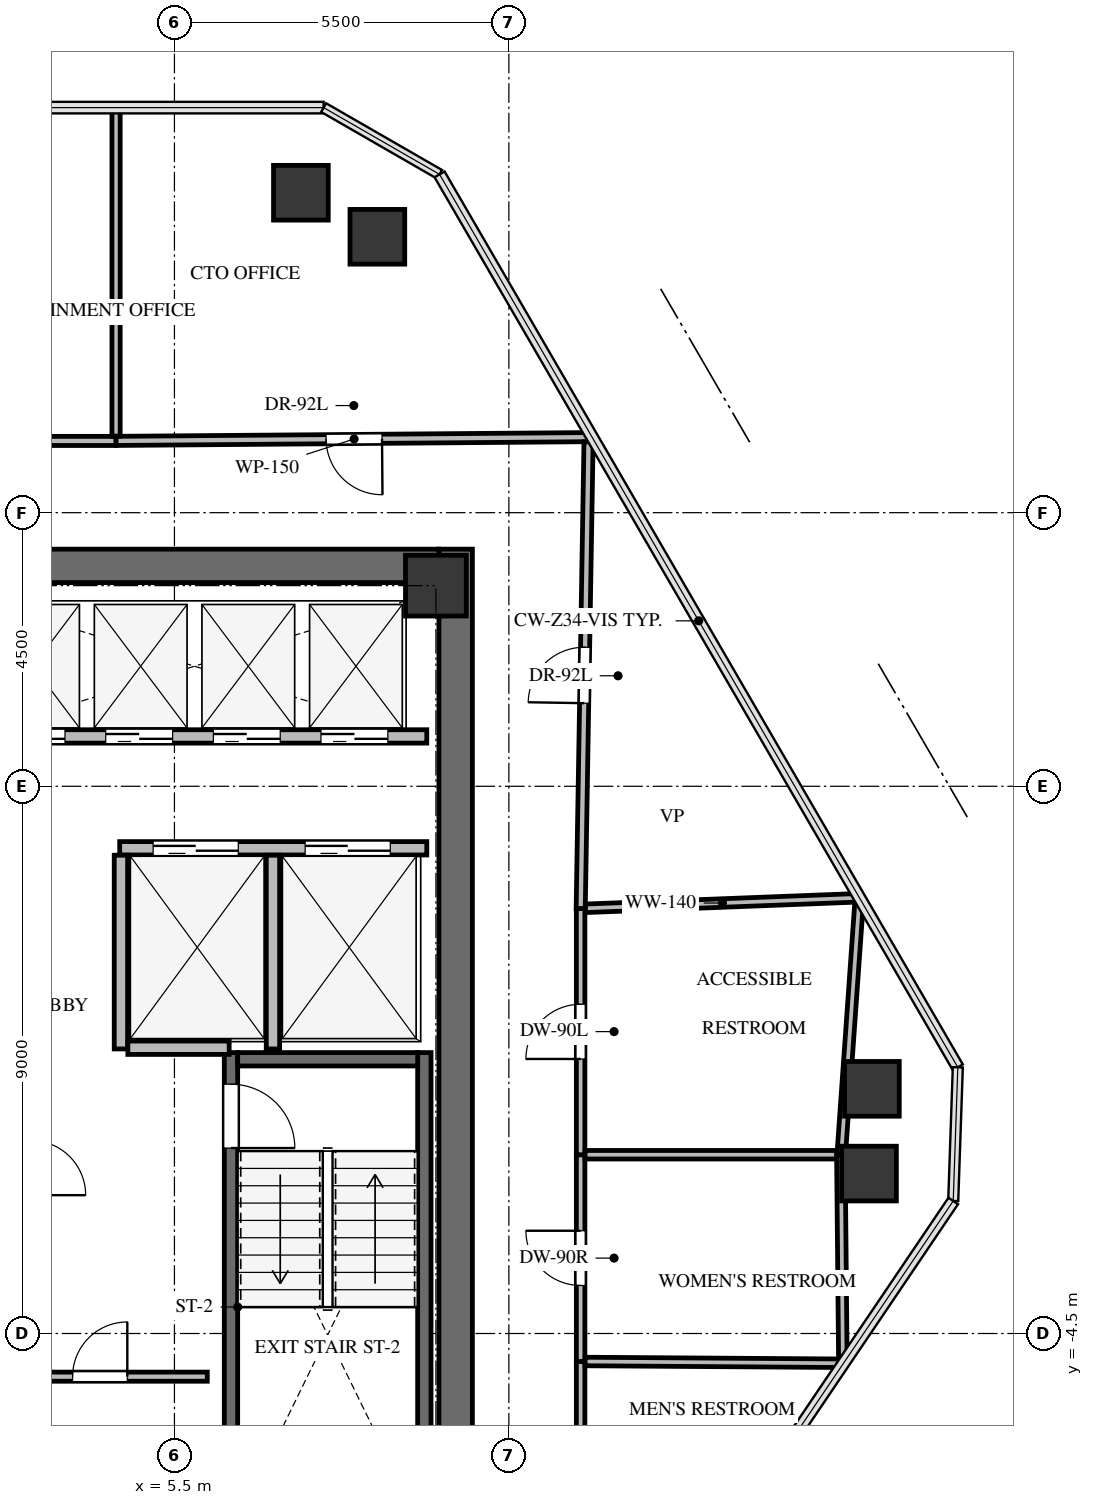
"""IFC4 building model, lengths in metres.
Left out: names, types, materials, properties, quantities, classifications, styles, units other than length and angle.
Written with IfcOpenShell. Run it as: python <this file> out.ifc"""

import sys

from ifc_helpers import new_model, si_unit, direction, frame, frame_2d, origin, origin_2d, place, context, subcontext, project, spatial, rectangle, extrude, source, transform, mapped, element, fill, save


model = new_model("IFC4")
c1 = context("Model", 3, precision=1e-05, world=origin(), true_north=direction((0.0, 1.0)))
c2 = subcontext(c1, "Body", "Model", "MODEL_VIEW")
j1 = project(units=[si_unit("LENGTHUNIT", "METRE"), si_unit("PLANEANGLEUNIT", "RADIAN")], contexts=[c1])
p1 = place(None, origin())
s1 = spatial("IfcSite", under=j1, at=p1, CompositionType="ELEMENT")
p2 = place(p1, origin())
s2 = spatial("IfcBuilding", under=s1, at=p2, CompositionType="ELEMENT")
p3 = place(p2, frame((0.0, 0.0, 228.2)))
s3 = spatial("IfcBuildingStorey", under=s2, at=p3, CompositionType="ELEMENT", Elevation=228.2)
p4 = place(p3, frame((10.125, -8.4, 0.0), z_axis=(0.0, 0.0, 1.0), x_axis=(0.0, 1.0, 0.0)))
e1 = element("IfcWall", 1, at=p4, inside=s3, PredefinedType="SHEAR", context=c2, shape_type="SweptSolid", body=[
    extrude(rectangle(XDim=16.8, YDim=0.55, at=frame_2d((8.4, 0.0))), origin(), (0.0, 0.0, 1.0), 3.3),
])
p5 = place(p3, frame((-9.85, 8.125, 0.0), z_axis=(0.0, 0.0, 1.0), x_axis=(1.0, 0.0, 0.0)))
e2 = element("IfcWall", 2, at=p5, inside=s3, PredefinedType="SHEAR", context=c2, shape_type="SweptSolid", body=[
    extrude(rectangle(XDim=19.7, YDim=0.55, at=frame_2d((9.85, 0.0))), origin(), (0.0, 0.0, 1.0), 3.3),
])
p6 = place(p3, frame((9.61, -7.77, -0.24), z_axis=(0.0, 0.0, 1.0), x_axis=(0.0, 1.0, 0.0)))
e3 = element("IfcWall", 3, at=p6, inside=s3, PredefinedType="SHEAR", context=c2, shape_type="SweptSolid", body=[
    extrude(rectangle(XDim=7.89, YDim=0.22, at=frame_2d((3.945, 0.0))), origin(), (0.0, 0.0, 1.0), 3.3),
])
p7 = place(p3, frame((6.43, 0.12, -0.24), z_axis=(0.0, 0.0, 1.0), x_axis=(0.0, -1.0, 0.0)))
e4 = element("IfcWall", 4, at=p7, inside=s3, PredefinedType="SHEAR", context=c2, shape_type="SweptSolid", body=[
    extrude(rectangle(XDim=7.89, YDim=0.22, at=frame_2d((3.945, 0.0))), origin(), (0.0, 0.0, 1.0), 3.3),
])
p8 = place(p7, frame((0.52, 0.0, 0.0)))
e5 = element("IfcOpeningElement", 5, at=p8, cuts=e4, PredefinedType="OPENING", context=c2, shape_type="SweptSolid", body=[
    extrude(rectangle(XDim=1.05, YDim=2.15, at=frame_2d((0.525, 1.075))), frame((0.0, 0.12, 0.0), z_axis=(0.0, -1.0, 0.0), x_axis=(1.0, 0.0, 0.0)), (0.0, 0.0, 1.0), 0.24),
])
p9 = place(p3, frame((9.5, 0.01, -0.24), z_axis=(0.0, 0.0, 1.0), x_axis=(-1.0, 0.0, 0.0)))
e6 = element("IfcWall", 6, at=p9, inside=s3, PredefinedType="SHEAR", context=c2, shape_type="SweptSolid", body=[
    extrude(rectangle(XDim=2.96, YDim=0.22, at=frame_2d((1.48, 0.0))), origin(), (0.0, 0.0, 1.0), 3.3),
])
m1 = source(origin(), c2, "Body", "SweptSolid", [
    extrude(rectangle(XDim=1.0, YDim=1.0, at=origin_2d()), origin(), (0.0, 0.0, 1.0), 3.3),
])
p10 = place(p3, frame((9.8, 7.8, -0.24), z_axis=(0.0, 0.0, 1.0), x_axis=(1.0, 0.0, 0.0)))
e7 = element("IfcColumn", 7, at=p10, inside=s3, PredefinedType="COLUMN", context=c2, shape_type="MappedRepresentation", body=[
    mapped(m1, transform((0.0, 0.0, 0.0), x_axis=(1.0, 0.0, 0.0), y_axis=(0.0, 1.0, 0.0), z_axis=(0.0, 0.0, 1.0), scale=1.0)),
])
m2 = source(origin(), c2, "Body", "SweptSolid", [
    extrude(rectangle(XDim=0.9, YDim=0.9, at=origin_2d()), origin(), (0.0, 0.0, 1.0), 3.3),
])
for number, where, z_axis, x_axis in (
    (8, (7.58, 14.262, -0.24), (0.0, 0.0, 1.0), (1.0, 0.0, 0.0)),
    (9, (8.837, 13.538, -0.24), (0.0, 0.0, 1.0), (1.0, 0.0, 0.0)),
    (10, (16.97, -0.476, -0.24), (0.0, 0.0, 1.0), (1.0, 0.0, 0.0)),
    (11, (16.922, -1.87, -0.24), (0.0, 0.0, 1.0), (1.0, 0.0, 0.0)),
):
    element("IfcColumn", number, at=place(p3, frame(where, z_axis=z_axis, x_axis=x_axis)), inside=s3, PredefinedType="COLUMN", context=c2, shape_type="MappedRepresentation", body=[
        mapped(m2, transform((0.0, 0.0, 0.0), x_axis=(1.0, 0.0, 0.0), y_axis=(0.0, 1.0, 0.0), z_axis=(0.0, 0.0, 1.0), scale=1.0)),
    ])
p11 = place(p3, frame((4.6, 3.48, 0.0), z_axis=(0.0, 0.0, 1.0), x_axis=(1.0, 0.0, 0.0)))
e12 = element("IfcWall", 12, at=p11, inside=s3, PredefinedType="SOLIDWALL", context=c2, shape_type="SweptSolid", body=[
    extrude(rectangle(XDim=5.05, YDim=0.22, at=frame_2d((2.525, 0.0))), origin(), (0.0, 0.0, 1.0), 3.045),
])
p12 = place(p11, frame((0.55, 0.0, 0.0)))
e13 = element("IfcOpeningElement", 13, at=p12, cuts=e12, PredefinedType="OPENING", context=c2, shape_type="SweptSolid", body=[
    extrude(rectangle(XDim=1.4, YDim=2.15, at=frame_2d((0.7, 1.075))), frame((0.0, 0.12, 0.0), z_axis=(0.0, -1.0, 0.0), x_axis=(1.0, 0.0, 0.0)), (0.0, 0.0, 1.0), 0.24),
])
p13 = place(p11, frame((3.05, 0.0, 0.0)))
e14 = element("IfcOpeningElement", 14, at=p13, cuts=e12, PredefinedType="OPENING", context=c2, shape_type="SweptSolid", body=[
    extrude(rectangle(XDim=1.4, YDim=2.15, at=frame_2d((0.7, 1.075))), frame((0.0, 0.12, 0.0), z_axis=(0.0, -1.0, 0.0), x_axis=(1.0, 0.0, 0.0)), (0.0, 0.0, 1.0), 0.24),
])
for number, where, z_axis, x_axis in (
    (15, (4.62, 0.18, 0.0), (0.0, 0.0, 1.0), (0.0, 1.0, 0.0)),
    (16, (7.12, 0.18, 0.0), (0.0, 0.0, 1.0), (0.0, 1.0, 0.0)),
):
    element("IfcWall", number, at=place(p3, frame(where, z_axis=z_axis, x_axis=x_axis)), inside=s3, PredefinedType="SOLIDWALL", context=c2, shape_type="SweptSolid", body=[
        extrude(rectangle(XDim=3.186, YDim=0.22, at=frame_2d((1.593, 0.0))), origin(), (0.0, 0.0, 1.0), 3.045),
    ])
p14 = place(p3, frame((4.734, 0.2, 0.0), z_axis=(0.0, 0.0, 1.0), x_axis=(1.0, 0.0, 0.0)))
e17 = element("IfcWall", 17, at=p14, inside=s3, PredefinedType="SOLIDWALL", context=c2, shape_type="SweptSolid", body=[
    extrude(rectangle(XDim=1.666, YDim=0.22, at=frame_2d((0.833, 0.0))), origin(), (0.0, 0.0, 1.0), 3.045),
])
p15 = place(p3, frame((2.325, 5.32, 0.0), z_axis=(0.0, 0.0, 1.0), x_axis=(1.0, 0.0, 0.0)))
e18 = element("IfcWall", 18, at=p15, inside=s3, PredefinedType="SOLIDWALL", context=c2, shape_type="SweptSolid", body=[
    extrude(rectangle(XDim=7.325, YDim=0.22, at=frame_2d((3.663, 0.0))), origin(), (0.0, 0.0, 1.0), 3.045),
])
p16 = place(p15, frame((0.275, 0.0, 0.0)))
e19 = element("IfcOpeningElement", 19, at=p16, cuts=e18, PredefinedType="OPENING", context=c2, shape_type="SweptSolid", body=[
    extrude(rectangle(XDim=1.1, YDim=2.15, at=frame_2d((0.55, 1.075))), frame((0.0, 0.12, 0.0), z_axis=(0.0, -1.0, 0.0), x_axis=(1.0, 0.0, 0.0)), (0.0, 0.0, 1.0), 0.24),
])
p17 = place(p15, frame((2.045, 0.0, 0.0)))
e20 = element("IfcOpeningElement", 20, at=p17, cuts=e18, PredefinedType="OPENING", context=c2, shape_type="SweptSolid", body=[
    extrude(rectangle(XDim=1.1, YDim=2.15, at=frame_2d((0.55, 1.075))), frame((0.0, 0.12, 0.0), z_axis=(0.0, -1.0, 0.0), x_axis=(1.0, 0.0, 0.0)), (0.0, 0.0, 1.0), 0.24),
])
p18 = place(p15, frame((3.815, 0.0, 0.0)))
e21 = element("IfcOpeningElement", 21, at=p18, cuts=e18, PredefinedType="OPENING", context=c2, shape_type="SweptSolid", body=[
    extrude(rectangle(XDim=1.1, YDim=2.15, at=frame_2d((0.55, 1.075))), frame((0.0, 0.12, 0.0), z_axis=(0.0, -1.0, 0.0), x_axis=(1.0, 0.0, 0.0)), (0.0, 0.0, 1.0), 0.24),
])
p19 = place(p15, frame((5.585, 0.0, 0.0)))
e22 = element("IfcOpeningElement", 22, at=p19, cuts=e18, PredefinedType="OPENING", context=c2, shape_type="SweptSolid", body=[
    extrude(rectangle(XDim=1.1, YDim=2.15, at=frame_2d((0.55, 1.075))), frame((0.0, 0.12, 0.0), z_axis=(0.0, -1.0, 0.0), x_axis=(1.0, 0.0, 0.0)), (0.0, 0.0, 1.0), 0.24),
])
p20 = place(p3, frame((2.51, -5.21, 0.0), z_axis=(0.0, 0.0, 1.0), x_axis=(1.0, 0.0, 0.0)))
e23 = element("IfcWall", 23, at=p20, inside=s3, PredefinedType="PARTITIONING", context=c2, shape_type="SweptSolid", body=[
    extrude(rectangle(XDim=3.53, YDim=0.15, at=frame_2d((1.765, 0.0))), origin(), (0.0, 0.0, 1.0), 3.045),
])
p21 = place(p20, frame((1.315, 0.0, 0.0)))
e24 = element("IfcOpeningElement", 24, at=p21, cuts=e23, PredefinedType="OPENING", context=c2, shape_type="SweptSolid", body=[
    extrude(rectangle(XDim=0.9, YDim=2.05, at=frame_2d((0.45, 1.025))), frame((0.0, 0.085, 0.0), z_axis=(0.0, -1.0, 0.0), x_axis=(1.0, 0.0, 0.0)), (0.0, 0.0, 1.0), 0.17),
])
p22 = place(p3, frame((12.18, -8.44, 0.0), z_axis=(0.0, 0.0, 1.0), x_axis=(0.0, 1.0, 0.0)))
e25 = element("IfcWall", 25, at=p22, inside=s3, PredefinedType="PARTITIONING", context=c2, shape_type="SweptSolid", body=[
    extrude(rectangle(XDim=3.48, YDim=0.14, at=frame_2d((1.74, 0.0))), origin(), (0.0, 0.0, 1.0), 2.399),
])
p23 = place(p22, frame((1.29, 0.0, 0.0)))
e26 = element("IfcOpeningElement", 26, at=p23, cuts=e25, PredefinedType="OPENING", context=c2, shape_type="SweptSolid", body=[
    extrude(rectangle(XDim=0.9, YDim=2.05, at=frame_2d((0.45, 1.025))), frame((0.0, 0.08, 0.0), z_axis=(0.0, -1.0, 0.0), x_axis=(1.0, 0.0, 0.0)), (0.0, 0.0, 1.0), 0.16),
])
p24 = place(p3, frame((12.18, -4.96, 0.0), z_axis=(0.0, 0.0, 1.0), x_axis=(0.0, 1.0, 0.0)))
e27 = element("IfcWall", 27, at=p24, inside=s3, PredefinedType="PARTITIONING", context=c2, shape_type="SweptSolid", body=[
    extrude(rectangle(XDim=3.4, YDim=0.14, at=frame_2d((1.7, 0.0))), origin(), (0.0, 0.0, 1.0), 3.045),
])
p25 = place(p24, frame((1.25, 0.0, 0.0)))
e28 = element("IfcOpeningElement", 28, at=p25, cuts=e27, PredefinedType="OPENING", context=c2, shape_type="SweptSolid", body=[
    extrude(rectangle(XDim=0.9, YDim=2.05, at=frame_2d((0.45, 1.025))), frame((0.0, 0.08, 0.0), z_axis=(0.0, -1.0, 0.0), x_axis=(1.0, 0.0, 0.0)), (0.0, 0.0, 1.0), 0.16),
])
p26 = place(p3, frame((12.18, -1.56, 0.0), z_axis=(0.0, 0.0, 1.0), x_axis=(0.0, 1.0, 0.0)))
e29 = element("IfcWall", 29, at=p26, inside=s3, PredefinedType="PARTITIONING", context=c2, shape_type="SweptSolid", body=[
    extrude(rectangle(XDim=4.05, YDim=0.14, at=frame_2d((2.025, 0.0))), origin(), (0.0, 0.0, 1.0), 2.301),
])
p27 = place(p26, frame((1.575, 0.0, 0.0)))
e30 = element("IfcOpeningElement", 30, at=p27, cuts=e29, PredefinedType="OPENING", context=c2, shape_type="SweptSolid", body=[
    extrude(rectangle(XDim=0.9, YDim=2.05, at=frame_2d((0.45, 1.025))), frame((0.0, 0.08, 0.0), z_axis=(0.0, -1.0, 0.0), x_axis=(1.0, 0.0, 0.0)), (0.0, 0.0, 1.0), 0.16),
])
p28 = place(p3, frame((4.54, 10.18, 0.0), z_axis=(0.0, 0.0, 1.0), x_axis=(-1.0, 0.0, 0.0)))
e31 = element("IfcWall", 31, at=p28, inside=s3, PredefinedType="PARTITIONING", context=c2, shape_type="SweptSolid", body=[
    extrude(rectangle(XDim=3.451, YDim=0.15, at=frame_2d((1.726, 0.0))), origin(), (0.0, 0.0, 1.0), 3.045),
])
p29 = place(p3, frame((12.368, 10.243, 0.0), z_axis=(0.0, 0.0, 1.0), x_axis=(-0.999968379606, -0.007952344825, 0.0)))
e32 = element("IfcWall", 32, at=p29, inside=s3, PredefinedType="PARTITIONING", context=c2, shape_type="SweptSolid", body=[
    extrude(rectangle(XDim=7.829, YDim=0.15, at=frame_2d((3.914, 0.0))), origin(), (0.0, 0.0, 1.0), 2.301),
])
p30 = place(p29, frame((3.454, 0.0, 0.0)))
e33 = element("IfcOpeningElement", 33, at=p30, cuts=e32, PredefinedType="OPENING", context=c2, shape_type="SweptSolid", body=[
    extrude(rectangle(XDim=0.92, YDim=2.1, at=frame_2d((0.46, 1.05))), frame((0.0, 0.085, 0.0), z_axis=(0.0, -1.0, 0.0), x_axis=(1.0, 0.0, 0.0)), (0.0, 0.0, 1.0), 0.17),
])
p31 = place(p3, frame((12.181, 2.49, 0.0), z_axis=(0.0, 0.0, 1.0), x_axis=(0.016828669653, 0.999858387912, 0.0)))
e34 = element("IfcWall", 34, at=p31, inside=s3, PredefinedType="PARTITIONING", context=c2, shape_type="SweptSolid", body=[
    extrude(rectangle(XDim=7.674, YDim=0.15, at=frame_2d((3.837, 0.0))), origin(), (0.0, 0.0, 1.0), 2.399),
])
p32 = place(p31, frame((3.377, 0.0, 0.0)))
e35 = element("IfcOpeningElement", 35, at=p32, cuts=e34, PredefinedType="OPENING", context=c2, shape_type="SweptSolid", body=[
    extrude(rectangle(XDim=0.92, YDim=2.1, at=frame_2d((0.46, 1.05))), frame((0.0, 0.085, 0.0), z_axis=(0.0, -1.0, 0.0), x_axis=(1.0, 0.0, 0.0)), (0.0, 0.0, 1.0), 0.17),
])
p33 = place(p3, frame((12.254, -4.96, 0.0), z_axis=(0.0, 0.0, 1.0), x_axis=(0.999976630429, -0.006836563198, 0.0)))
e36 = element("IfcWall", 36, at=p33, inside=s3, PredefinedType="PARTITIONING", context=c2, shape_type="SweptSolid", body=[
    extrude(rectangle(XDim=4.25, YDim=0.14, at=frame_2d((2.125, 0.0))), origin(), (0.0, 0.0, 1.0), 2.399),
])
p34 = place(p3, frame((12.254, -1.56, 0.0), z_axis=(0.0, 0.0, 1.0), x_axis=(1.0, 0.0, 0.0)))
e37 = element("IfcWall", 37, at=p34, inside=s3, PredefinedType="PARTITIONING", context=c2, shape_type="SweptSolid", body=[
    extrude(rectangle(XDim=4.206, YDim=0.14, at=frame_2d((2.103, 0.0))), origin(), (0.0, 0.0, 1.0), 2.301),
])
p35 = place(p3, frame((16.46, -1.56, 0.0), z_axis=(0.0, 0.0, 1.0), x_axis=(0.009604446748, -0.999953876238, 0.0)))
e38 = element("IfcWall", 38, at=p35, inside=s3, PredefinedType="PARTITIONING", context=c2, shape_type="SweptSolid", body=[
    extrude(rectangle(XDim=3.355, YDim=0.14, at=frame_2d((1.678, 0.0))), origin(), (0.0, 0.0, 1.0), 2.301),
])
p36 = place(p3, frame((12.26, 2.493, 0.0), z_axis=(0.0, 0.0, 1.0), x_axis=(0.999256206289, 0.038562082324, 0.0)))
e39 = element("IfcWall", 39, at=p36, inside=s3, PredefinedType="PARTITIONING", context=c2, shape_type="SweptSolid", body=[
    extrude(rectangle(XDim=4.508, YDim=0.14, at=frame_2d((2.254, 0.0))), origin(), (0.0, 0.0, 1.0), 2.399),
])
p37 = place(p3, frame((16.76, 2.593, 0.0), z_axis=(0.0, 0.0, 1.0), x_axis=(-0.07055102187, -0.997508172053, 0.0)))
e40 = element("IfcWall", 40, at=p37, inside=s3, PredefinedType="PARTITIONING", context=c2, shape_type="SweptSolid", body=[
    extrude(rectangle(XDim=4.163, YDim=0.14, at=frame_2d((2.082, 0.0))), origin(), (0.0, 0.0, 1.0), 2.301),
])
p38 = place(p3, frame((4.54, 15.662, 0.0), z_axis=(0.0, 0.0, 1.0), x_axis=(0.0, -1.0, 0.0)))
e41 = element("IfcWall", 41, at=p38, inside=s3, PredefinedType="PARTITIONING", context=c2, shape_type="SweptSolid", body=[
    extrude(rectangle(XDim=5.403, YDim=0.135, at=frame_2d((2.701, 0.0))), origin(), (0.0, 0.0, 1.0), 2.399),
])
m3 = source(origin(), c2, "Body", "SweptSolid", [
    extrude(rectangle(XDim=1.05, YDim=2.15, at=frame_2d((0.525, 1.075))), frame((0.0, 0.025, 0.0), z_axis=(0.0, -1.0, 0.0), x_axis=(1.0, 0.0, 0.0)), (0.0, 0.0, 1.0), 0.05),
])
p39 = place(p8, origin())
e42 = element("IfcDoor", 42, at=p39, inside=s3, OperationType="SINGLE_SWING_RIGHT", PredefinedType="DOOR", context=c2, shape_type="MappedRepresentation", body=[
    mapped(m3, transform((0.0, 0.0, 0.0), x_axis=(1.0, 0.0, 0.0), y_axis=(0.0, 1.0, 0.0), z_axis=(0.0, 0.0, 1.0), scale=1.0)),
])
fill(e5, e42)
m4 = source(origin(), c2, "Body", "SweptSolid", [
    extrude(rectangle(XDim=1.4, YDim=2.15, at=frame_2d((0.7, 1.075))), frame((0.0, 0.025, 0.0), z_axis=(0.0, -1.0, 0.0), x_axis=(1.0, 0.0, 0.0)), (0.0, 0.0, 1.0), 0.05),
])
p40 = place(p12, origin())
e43 = element("IfcDoor", 43, at=p40, inside=s3, OperationType="DOUBLE_DOOR_SLIDING", PredefinedType="DOOR", context=c2, shape_type="MappedRepresentation", body=[
    mapped(m4, transform((0.0, 0.0, 0.0), x_axis=(1.0, 0.0, 0.0), y_axis=(0.0, 1.0, 0.0), z_axis=(0.0, 0.0, 1.0), scale=1.0)),
])
fill(e13, e43)
p41 = place(p13, origin())
e44 = element("IfcDoor", 44, at=p41, inside=s3, OperationType="DOUBLE_DOOR_SLIDING", PredefinedType="DOOR", context=c2, shape_type="MappedRepresentation", body=[
    mapped(m4, transform((0.0, 0.0, 0.0), x_axis=(1.0, 0.0, 0.0), y_axis=(0.0, 1.0, 0.0), z_axis=(0.0, 0.0, 1.0), scale=1.0)),
])
fill(e14, e44)
m5 = source(origin(), c2, "Body", "SweptSolid", [
    extrude(rectangle(XDim=1.1, YDim=2.15, at=frame_2d((0.55, 1.075))), frame((0.0, 0.025, 0.0), z_axis=(0.0, -1.0, 0.0), x_axis=(1.0, 0.0, 0.0)), (0.0, 0.0, 1.0), 0.05),
])
p42 = place(p16, origin())
e45 = element("IfcDoor", 45, at=p42, inside=s3, OperationType="DOUBLE_DOOR_SLIDING", PredefinedType="DOOR", context=c2, shape_type="MappedRepresentation", body=[
    mapped(m5, transform((0.0, 0.0, 0.0), x_axis=(1.0, 0.0, 0.0), y_axis=(0.0, 1.0, 0.0), z_axis=(0.0, 0.0, 1.0), scale=1.0)),
])
fill(e19, e45)
p43 = place(p17, origin())
e46 = element("IfcDoor", 46, at=p43, inside=s3, OperationType="DOUBLE_DOOR_SLIDING", PredefinedType="DOOR", context=c2, shape_type="MappedRepresentation", body=[
    mapped(m5, transform((0.0, 0.0, 0.0), x_axis=(1.0, 0.0, 0.0), y_axis=(0.0, 1.0, 0.0), z_axis=(0.0, 0.0, 1.0), scale=1.0)),
])
fill(e20, e46)
p44 = place(p18, origin())
e47 = element("IfcDoor", 47, at=p44, inside=s3, OperationType="DOUBLE_DOOR_SLIDING", PredefinedType="DOOR", context=c2, shape_type="MappedRepresentation", body=[
    mapped(m5, transform((0.0, 0.0, 0.0), x_axis=(1.0, 0.0, 0.0), y_axis=(0.0, 1.0, 0.0), z_axis=(0.0, 0.0, 1.0), scale=1.0)),
])
fill(e21, e47)
p45 = place(p19, origin())
e48 = element("IfcDoor", 48, at=p45, inside=s3, OperationType="DOUBLE_DOOR_SLIDING", PredefinedType="DOOR", context=c2, shape_type="MappedRepresentation", body=[
    mapped(m5, transform((0.0, 0.0, 0.0), x_axis=(1.0, 0.0, 0.0), y_axis=(0.0, 1.0, 0.0), z_axis=(0.0, 0.0, 1.0), scale=1.0)),
])
fill(e22, e48)
m6 = source(origin(), c2, "Body", "SweptSolid", [
    extrude(rectangle(XDim=0.9, YDim=2.05, at=frame_2d((0.45, 1.025))), frame((0.0, 0.025, 0.0), z_axis=(0.0, -1.0, 0.0), x_axis=(1.0, 0.0, 0.0)), (0.0, 0.0, 1.0), 0.05),
])
p46 = place(p21, origin())
e49 = element("IfcDoor", 49, at=p46, inside=s3, OperationType="SINGLE_SWING_RIGHT", PredefinedType="DOOR", context=c2, shape_type="MappedRepresentation", body=[
    mapped(m6, transform((0.0, 0.0, 0.0), x_axis=(1.0, 0.0, 0.0), y_axis=(0.0, 1.0, 0.0), z_axis=(0.0, 0.0, 1.0), scale=1.0)),
])
fill(e24, e49)
m7 = source(origin(), c2, "Body", "SweptSolid", [
    extrude(rectangle(XDim=0.9, YDim=2.05, at=frame_2d((0.45, 1.025))), frame((0.0, 0.025, 0.0), z_axis=(0.0, -1.0, 0.0), x_axis=(1.0, 0.0, 0.0)), (0.0, 0.0, 1.0), 0.05),
])
p47 = place(p25, origin())
e50 = element("IfcDoor", 50, at=p47, inside=s3, OperationType="SINGLE_SWING_RIGHT", PredefinedType="DOOR", context=c2, shape_type="MappedRepresentation", body=[
    mapped(m7, transform((0.0, 0.0, 0.0), x_axis=(1.0, 0.0, 0.0), y_axis=(0.0, 1.0, 0.0), z_axis=(0.0, 0.0, 1.0), scale=1.0)),
])
fill(e28, e50)
m8 = source(origin(), c2, "Body", "SweptSolid", [
    extrude(rectangle(XDim=0.9, YDim=2.05, at=frame_2d((0.45, 1.025))), frame((0.0, 0.025, 0.0), z_axis=(0.0, -1.0, 0.0), x_axis=(1.0, 0.0, 0.0)), (0.0, 0.0, 1.0), 0.05),
])
p48 = place(p27, origin())
e51 = element("IfcDoor", 51, at=p48, inside=s3, OperationType="SINGLE_SWING_LEFT", PredefinedType="DOOR", context=c2, shape_type="MappedRepresentation", body=[
    mapped(m8, transform((0.0, 0.0, 0.0), x_axis=(1.0, 0.0, 0.0), y_axis=(0.0, 1.0, 0.0), z_axis=(0.0, 0.0, 1.0), scale=1.0)),
])
fill(e30, e51)
m9 = source(origin(), c2, "Body", "SweptSolid", [
    extrude(rectangle(XDim=0.92, YDim=2.1, at=frame_2d((0.46, 1.05))), frame((0.0, 0.025, 0.0), z_axis=(0.0, -1.0, 0.0), x_axis=(1.0, 0.0, 0.0)), (0.0, 0.0, 1.0), 0.05),
])
p49 = place(p30, origin())
e52 = element("IfcDoor", 52, at=p49, inside=s3, OperationType="SINGLE_SWING_LEFT", PredefinedType="DOOR", context=c2, shape_type="MappedRepresentation", body=[
    mapped(m9, transform((0.0, 0.0, 0.0), x_axis=(1.0, 0.0, 0.0), y_axis=(0.0, 1.0, 0.0), z_axis=(0.0, 0.0, 1.0), scale=1.0)),
])
fill(e33, e52)
p50 = place(p32, origin())
e53 = element("IfcDoor", 53, at=p50, inside=s3, OperationType="SINGLE_SWING_LEFT", PredefinedType="DOOR", context=c2, shape_type="MappedRepresentation", body=[
    mapped(m9, transform((0.0, 0.0, 0.0), x_axis=(1.0, 0.0, 0.0), y_axis=(0.0, 1.0, 0.0), z_axis=(0.0, 0.0, 1.0), scale=1.0)),
])
fill(e35, e53)
save(model, sys.argv[1])
